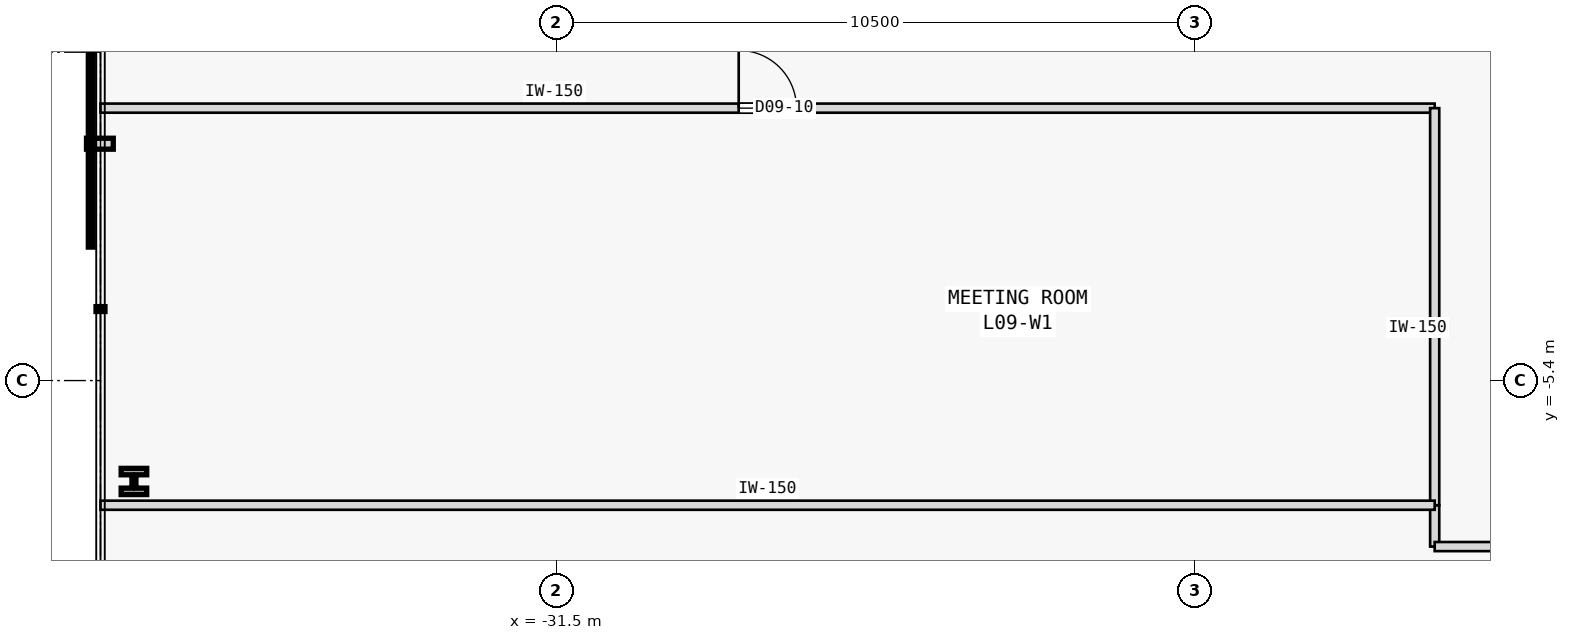
"""IFC4 building model, lengths in metres.
Left out: names, types, materials, properties, quantities, classifications, styles, units other than length and angle.
Written with IfcOpenShell. Run it as: python <this file> out.ifc"""

import sys

from ifc_helpers import new_model, si_unit, direction, frame, frame_2d, origin, origin_2d, place, context, subcontext, project, spatial, rectangle, i_section, extrude, element, fill, save


model = new_model("IFC4")
c1 = context("Model", 3, precision=1e-05, world=origin(), true_north=direction((0.0, 1.0)))
c2 = subcontext(c1, "Body", "Model", "MODEL_VIEW")
j1 = project(units=[si_unit("LENGTHUNIT", "METRE"), si_unit("PLANEANGLEUNIT", "RADIAN")], contexts=[c1])
p1 = place(None, origin())
s1 = spatial("IfcSite", under=j1, at=p1, CompositionType="ELEMENT")
p2 = place(p1, origin())
s2 = spatial("IfcBuilding", under=s1, at=p2, CompositionType="ELEMENT")
p3 = place(p2, frame((0.0, 0.0, 40.8)))
s3 = spatial("IfcBuildingStorey", under=s2, at=p3, CompositionType="ELEMENT", Elevation=40.8)
p4 = place(p3, frame((-38.45, -7.059, 0.0), z_axis=(0.0, 0.0, 1.0), x_axis=(1.0, 0.0, 0.0)))
e1 = element("IfcColumn", 1, at=p4, inside=s3, PredefinedType="COLUMN", context=c2, shape_type="SweptSolid", body=[
    extrude(i_section(OverallWidth=0.42, OverallDepth=0.431, WebThickness=0.065, FlangeThickness=0.106, FilletRadius=0.015, at=origin_2d()), origin(), (0.0, 0.0, 1.0), 3.8),
])
p5 = place(p3, frame((-17.059, -8.13, 0.0), z_axis=(0.0, 0.0, 1.0), x_axis=(0.0, 1.0, 0.0)))
e2 = element("IfcWall", 2, at=p5, inside=s3, PredefinedType="PARTITIONING", context=c2, shape_type="SweptSolid", body=[
    extrude(rectangle(XDim=0.68, YDim=0.15, at=frame_2d((0.34, 0.0))), origin(), (0.0, 0.0, 1.0), 3.575),
])
p6 = place(p3, frame((-17.059, -8.13, 0.0), z_axis=(0.0, 0.0, 1.0), x_axis=(1.0, 0.0, 0.0)))
e3 = element("IfcWall", 3, at=p6, inside=s3, PredefinedType="PARTITIONING", context=c2, shape_type="SweptSolid", body=[
    extrude(rectangle(XDim=13.939, YDim=0.15, at=frame_2d((6.969, 0.0))), origin(), (0.0, 0.0, 1.0), 3.575),
])
p7 = place(p6, frame((4.404, 0.0, 0.0)))
e4 = element("IfcOpeningElement", 4, at=p7, cuts=e3, PredefinedType="OPENING", context=c2, shape_type="SweptSolid", body=[
    extrude(rectangle(XDim=0.95, YDim=2.15, at=frame_2d((0.475, 1.075))), frame((0.0, 0.085, 0.0), z_axis=(0.0, -1.0, 0.0), x_axis=(1.0, 0.0, 0.0)), (0.0, 0.0, 1.0), 0.17),
])
p8 = place(p3, frame((-39.0, -0.92, 0.0), z_axis=(0.0, 0.0, 1.0), x_axis=(1.0, 0.0, 0.0)))
e5 = element("IfcWall", 5, at=p8, inside=s3, PredefinedType="PARTITIONING", context=c2, shape_type="SweptSolid", body=[
    extrude(rectangle(XDim=21.941, YDim=0.15, at=frame_2d((10.97, 0.0))), origin(), (0.0, 0.0, 1.0), 3.575),
])
p9 = place(p8, frame((10.496, 0.0, 0.0)))
e6 = element("IfcOpeningElement", 6, at=p9, cuts=e5, PredefinedType="OPENING", context=c2, shape_type="SweptSolid", body=[
    extrude(rectangle(XDim=0.95, YDim=2.15, at=frame_2d((0.475, 1.075))), frame((0.0, 0.085, 0.0), z_axis=(0.0, -1.0, 0.0), x_axis=(1.0, 0.0, 0.0)), (0.0, 0.0, 1.0), 0.17),
])
p10 = place(p3, frame((-17.059, -7.45, 0.0), z_axis=(0.0, 0.0, 1.0), x_axis=(0.0, 1.0, 0.0)))
e7 = element("IfcWall", 7, at=p10, inside=s3, PredefinedType="PARTITIONING", context=c2, shape_type="SweptSolid", body=[
    extrude(rectangle(XDim=6.53, YDim=0.15, at=frame_2d((3.265, 0.0))), origin(), (0.0, 0.0, 1.0), 3.575),
])
p11 = place(p3, frame((-39.0, -7.45, 0.0), z_axis=(0.0, 0.0, 1.0), x_axis=(1.0, 0.0, 0.0)))
e8 = element("IfcWall", 8, at=p11, inside=s3, PredefinedType="PARTITIONING", context=c2, shape_type="SweptSolid", body=[
    extrude(rectangle(XDim=21.941, YDim=0.15, at=frame_2d((10.97, 0.0))), origin(), (0.0, 0.0, 1.0), 3.575),
])
p12 = place(p9, origin())
e9 = element("IfcDoor", 9, at=p12, inside=s3, OperationType="SINGLE_SWING_LEFT", PredefinedType="DOOR", context=c2, shape_type="SweptSolid", body=[
    extrude(rectangle(XDim=0.95, YDim=2.15, at=frame_2d((0.475, 1.075))), frame((0.0, 0.025, 0.0), z_axis=(0.0, -1.0, 0.0), x_axis=(1.0, 0.0, 0.0)), (0.0, 0.0, 1.0), 0.05),
])
fill(e6, e9)
save(model, sys.argv[1])
